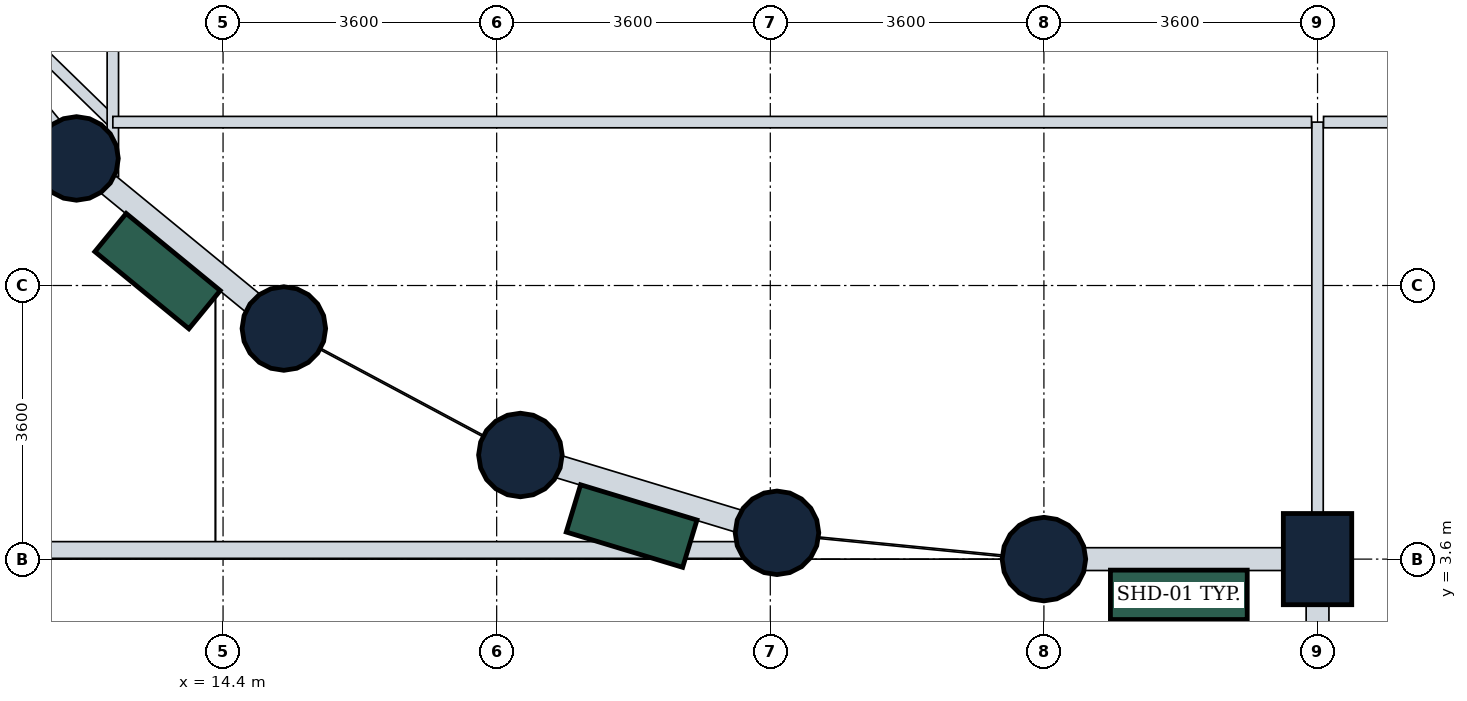
"""IFC4 building model, lengths in metres.
Left out: names, types, materials, properties, quantities, classifications, styles, units other than length and angle.
Written with IfcOpenShell. Run it as: python <this file> out.ifc"""

import sys

from ifc_helpers import new_model, si_unit, direction, frame, frame_2d, origin, origin_2d, place, context, subcontext, project, spatial, rectangle, circle, extrude, element, fill, save


model = new_model("IFC4")
c1 = context("Model", 3, precision=1e-05, world=origin(), true_north=direction((0.0, 1.0)))
c2 = subcontext(c1, "Body", "Model", "MODEL_VIEW")
j1 = project(units=[si_unit("LENGTHUNIT", "METRE"), si_unit("PLANEANGLEUNIT", "RADIAN")], contexts=[c1])
p1 = place(None, origin())
s1 = spatial("IfcSite", under=j1, at=p1, CompositionType="ELEMENT")
p2 = place(p1, origin())
s2 = spatial("IfcBuilding", under=s1, at=p2, CompositionType="ELEMENT")
p3 = place(p2, frame((0.0, 0.0, 24.0)))
s3 = spatial("IfcBuildingStorey", under=s2, at=p3, CompositionType="ELEMENT", Elevation=24.0)
for number, where, z_axis, x_axis in (
    (1, (12.472, 8.872, 0.0), (0.0, 0.0, 1.0), (1.0, 0.0, 0.0)),
    (2, (15.2, 6.634, 0.0), (0.0, 0.0, 1.0), (1.0, 0.0, 0.0)),
    (3, (18.312, 4.97, 0.0), (0.0, 0.0, 1.0), (1.0, 0.0, 0.0)),
    (4, (21.688, 3.946, 0.0), (0.0, 0.0, 1.0), (1.0, 0.0, 0.0)),
    (5, (25.2, 3.6, 0.0), (0.0, 0.0, 1.0), (1.0, 0.0, 0.0)),
):
    element("IfcColumn", number, at=place(p3, frame(where, z_axis=z_axis, x_axis=x_axis)), inside=s3, PredefinedType="COLUMN", context=c2, shape_type="SweptSolid", body=[
        extrude(circle(Radius=0.55, at=origin_2d()), origin(), (0.0, 0.0, 1.0), 3.9),
    ])
p4 = place(p3, frame((28.8, 3.6, 0.0), z_axis=(0.0, 0.0, 1.0), x_axis=(1.0, 0.0, 0.0)))
e6 = element("IfcColumn", 6, at=p4, inside=s3, PredefinedType="COLUMN", context=c2, shape_type="SweptSolid", body=[
    extrude(rectangle(XDim=0.9, YDim=1.2, at=origin_2d()), origin(), (0.0, 0.0, 1.0), 3.9),
])
p5 = place(p3, frame((0.12, 3.72, 0.0), z_axis=(0.0, 0.0, 1.0), x_axis=(1.0, 0.0, 0.0)))
e7 = element("IfcWall", 7, at=p5, inside=s3, PredefinedType="PARAPET", context=c2, shape_type="SweptSolid", body=[
    extrude(rectangle(XDim=21.48, YDim=0.22, at=frame_2d((10.74, 0.0))), origin(), (0.0, 0.0, 1.0), 1.15),
])
p6 = place(p3, frame((28.8, 3.6, 0.0), z_axis=(0.0, 0.0, 1.0), x_axis=(-1.0, 0.0, 0.0)))
e8 = element("IfcWall", 8, at=p6, inside=s3, PredefinedType="STANDARD", context=c2, shape_type="SweptSolid", body=[
    extrude(rectangle(XDim=3.6, YDim=0.3, at=frame_2d((1.8, 0.0))), origin(), (0.0, 0.0, 1.0), 2.93),
])
p7 = place(p6, frame((0.925, 0.0, 0.85)))
e9 = element("IfcOpeningElement", 9, at=p7, cuts=e8, PredefinedType="OPENING", context=c2, shape_type="SweptSolid", body=[
    extrude(rectangle(XDim=1.8, YDim=1.35, at=frame_2d((0.9, 0.675))), frame((0.0, 0.16, 0.0), z_axis=(0.0, -1.0, 0.0), x_axis=(1.0, 0.0, 0.0)), (0.0, 0.0, 1.0), 0.32),
])
p8 = place(p3, frame((28.8, 1.5, 0.0), z_axis=(0.0, 0.0, 1.0), x_axis=(0.0, 1.0, 0.0)))
e10 = element("IfcWall", 10, at=p8, inside=s3, PredefinedType="STANDARD", context=c2, shape_type="SweptSolid", body=[
    extrude(rectangle(XDim=2.1, YDim=0.3, at=frame_2d((1.05, 0.0))), origin(), (0.0, 0.0, 1.0), 2.93),
])
p9 = place(p3, frame((12.472, 8.872, 0.0), z_axis=(0.0, 0.0, 1.0), x_axis=(-0.634258295121, 0.773121216285, 0.0)))
e11 = element("IfcWall", 11, at=p9, inside=s3, PredefinedType="STANDARD", context=c2, shape_type="SweptSolid", body=[
    extrude(rectangle(XDim=3.529, YDim=0.3, at=frame_2d((1.764, 0.0))), origin(), (0.0, 0.0, 1.0), 2.93),
])
p10 = place(p3, frame((15.2, 6.634, 0.0), z_axis=(0.0, 0.0, 1.0), x_axis=(-0.773121216285, 0.634258295121, 0.0)))
e12 = element("IfcWall", 12, at=p10, inside=s3, PredefinedType="STANDARD", context=c2, shape_type="SweptSolid", body=[
    extrude(rectangle(XDim=3.529, YDim=0.3, at=frame_2d((1.764, 0.0))), origin(), (0.0, 0.0, 1.0), 2.93),
])
p11 = place(p10, frame((0.964, 0.0, 0.85)))
e13 = element("IfcOpeningElement", 13, at=p11, cuts=e12, PredefinedType="OPENING", context=c2, shape_type="SweptSolid", body=[
    extrude(rectangle(XDim=1.6, YDim=1.35, at=frame_2d((0.8, 0.675))), frame((0.0, 0.16, 0.0), z_axis=(0.0, -1.0, 0.0), x_axis=(1.0, 0.0, 0.0)), (0.0, 0.0, 1.0), 0.32),
])
p12 = place(p3, frame((21.688, 3.946, 0.0), z_axis=(0.0, 0.0, 1.0), x_axis=(-0.956953367403, 0.290241714123, 0.0)))
e14 = element("IfcWall", 14, at=p12, inside=s3, PredefinedType="STANDARD", context=c2, shape_type="SweptSolid", body=[
    extrude(rectangle(XDim=3.528, YDim=0.3, at=frame_2d((1.764, 0.0))), origin(), (0.0, 0.0, 1.0), 2.93),
])
p13 = place(p12, frame((1.056, 0.0, 0.85)))
e15 = element("IfcOpeningElement", 15, at=p13, cuts=e14, PredefinedType="OPENING", context=c2, shape_type="SweptSolid", body=[
    extrude(rectangle(XDim=1.6, YDim=1.35, at=frame_2d((0.8, 0.675))), frame((0.0, 0.16, 0.0), z_axis=(0.0, -1.0, 0.0), x_axis=(1.0, 0.0, 0.0)), (0.0, 0.0, 1.0), 0.32),
])
p14 = place(p3, frame((28.8, 9.35, 0.0), z_axis=(0.0, 0.0, 1.0), x_axis=(0.0, -1.0, 0.0)))
e16 = element("IfcWall", 16, at=p14, inside=s3, PredefinedType="PARTITIONING", context=c2, shape_type="SweptSolid", body=[
    extrude(rectangle(XDim=5.596, YDim=0.15, at=frame_2d((2.798, 0.0))), origin(), (0.0, 0.0, 1.0), 3.635),
])
p15 = place(p3, frame((12.95, 9.35, 0.0), z_axis=(0.0, 0.0, 1.0), x_axis=(-0.716473772124, 0.697614029287, 0.0)))
e17 = element("IfcWall", 17, at=p15, inside=s3, PredefinedType="PARTITIONING", context=c2, shape_type="SweptSolid", body=[
    extrude(rectangle(XDim=3.728, YDim=0.15, at=frame_2d((1.864, 0.0))), origin(), (0.0, 0.0, 1.0), 2.93),
])
p16 = place(p3, frame((12.95, 8.634, 0.0), z_axis=(0.0, 0.0, 1.0), x_axis=(0.0, 1.0, 0.0)))
e18 = element("IfcWall", 18, at=p16, inside=s3, PredefinedType="PARTITIONING", context=c2, shape_type="SweptSolid", body=[
    extrude(rectangle(XDim=7.887, YDim=0.15, at=frame_2d((3.944, 0.0))), origin(), (0.0, 0.0, 1.0), 2.93),
])
p17 = place(p16, frame((4.947, 0.0, 0.0)))
e19 = element("IfcOpeningElement", 19, at=p17, cuts=e18, PredefinedType="OPENING", context=c2, shape_type="SweptSolid", body=[
    extrude(rectangle(XDim=1.0, YDim=2.1, at=frame_2d((0.5, 1.05))), frame((0.0, 0.085, 0.0), z_axis=(0.0, -1.0, 0.0), x_axis=(1.0, 0.0, 0.0)), (0.0, 0.0, 1.0), 0.17),
])
p18 = place(p3, frame((12.95, 9.35, 0.0), z_axis=(0.0, 0.0, 1.0), x_axis=(1.0, 0.0, 0.0)))
e20 = element("IfcWall", 20, at=p18, inside=s3, PredefinedType="PARTITIONING", context=c2, shape_type="SweptSolid", body=[
    extrude(rectangle(XDim=15.771, YDim=0.15, at=frame_2d((7.885, 0.0))), origin(), (0.0, 0.0, 1.0), 3.04),
])
p19 = place(p18, frame((4.836, 0.0, 0.0)))
e21 = element("IfcOpeningElement", 21, at=p19, cuts=e20, PredefinedType="OPENING", context=c2, shape_type="SweptSolid", body=[
    extrude(rectangle(XDim=1.0, YDim=2.1, at=frame_2d((0.5, 1.05))), frame((0.0, 0.085, 0.0), z_axis=(0.0, -1.0, 0.0), x_axis=(1.0, 0.0, 0.0)), (0.0, 0.0, 1.0), 0.17),
])
p20 = place(p3, frame((28.879, 9.35, 0.0), z_axis=(0.0, 0.0, 1.0), x_axis=(1.0, 0.0, 0.0)))
e22 = element("IfcWall", 22, at=p20, inside=s3, PredefinedType="PARTITIONING", context=c2, shape_type="SweptSolid", body=[
    extrude(rectangle(XDim=5.521, YDim=0.15, at=frame_2d((2.76, 0.0))), origin(), (0.0, 0.0, 1.0), 3.635),
])
p21 = place(p20, frame((0.36, 0.0, 0.0)))
e23 = element("IfcOpeningElement", 23, at=p21, cuts=e22, PredefinedType="OPENING", context=c2, shape_type="SweptSolid", body=[
    extrude(rectangle(XDim=1.0, YDim=2.1, at=frame_2d((0.5, 1.05))), frame((0.0, 0.085, 0.0), z_axis=(0.0, -1.0, 0.0), x_axis=(1.0, 0.0, 0.0)), (0.0, 0.0, 1.0), 0.17),
])
p22 = place(p7, origin())
e24 = element("IfcWindow", 24, at=p22, inside=s3, PartitioningType="SINGLE_PANEL", PredefinedType="WINDOW", context=c2, shape_type="SweptSolid", body=[
    extrude(rectangle(XDim=1.8, YDim=1.35, at=frame_2d((0.9, 0.675))), frame((0.0, 0.03, 0.0), z_axis=(0.0, -1.0, 0.0), x_axis=(1.0, 0.0, 0.0)), (0.0, 0.0, 1.0), 0.06),
])
fill(e9, e24)
p23 = place(p11, origin())
e25 = element("IfcWindow", 25, at=p23, inside=s3, PartitioningType="SINGLE_PANEL", PredefinedType="WINDOW", context=c2, shape_type="SweptSolid", body=[
    extrude(rectangle(XDim=1.6, YDim=1.35, at=frame_2d((0.8, 0.675))), frame((0.0, 0.03, 0.0), z_axis=(0.0, -1.0, 0.0), x_axis=(1.0, 0.0, 0.0)), (0.0, 0.0, 1.0), 0.06),
])
fill(e13, e25)
p24 = place(p13, origin())
e26 = element("IfcWindow", 26, at=p24, inside=s3, PartitioningType="SINGLE_PANEL", PredefinedType="WINDOW", context=c2, shape_type="SweptSolid", body=[
    extrude(rectangle(XDim=1.6, YDim=1.35, at=frame_2d((0.8, 0.675))), frame((0.0, 0.03, 0.0), z_axis=(0.0, -1.0, 0.0), x_axis=(1.0, 0.0, 0.0)), (0.0, 0.0, 1.0), 0.06),
])
fill(e15, e26)
p25 = place(p19, origin())
e27 = element("IfcDoor", 27, at=p25, inside=s3, OperationType="SINGLE_SWING_LEFT", PredefinedType="DOOR", context=c2, shape_type="SweptSolid", body=[
    extrude(rectangle(XDim=1.0, YDim=2.1, at=frame_2d((0.5, 1.05))), frame((0.0, 0.025, 0.0), z_axis=(0.0, -1.0, 0.0), x_axis=(1.0, 0.0, 0.0)), (0.0, 0.0, 1.0), 0.05),
])
fill(e21, e27)
p26 = place(p21, origin())
e28 = element("IfcDoor", 28, at=p26, inside=s3, OperationType="SINGLE_SWING_RIGHT", PredefinedType="DOOR", context=c2, shape_type="SweptSolid", body=[
    extrude(rectangle(XDim=1.0, YDim=2.1, at=frame_2d((0.5, 1.05))), frame((0.0, 0.025, 0.0), z_axis=(0.0, -1.0, 0.0), x_axis=(1.0, 0.0, 0.0)), (0.0, 0.0, 1.0), 0.05),
])
fill(e23, e28)
save(model, sys.argv[1])
